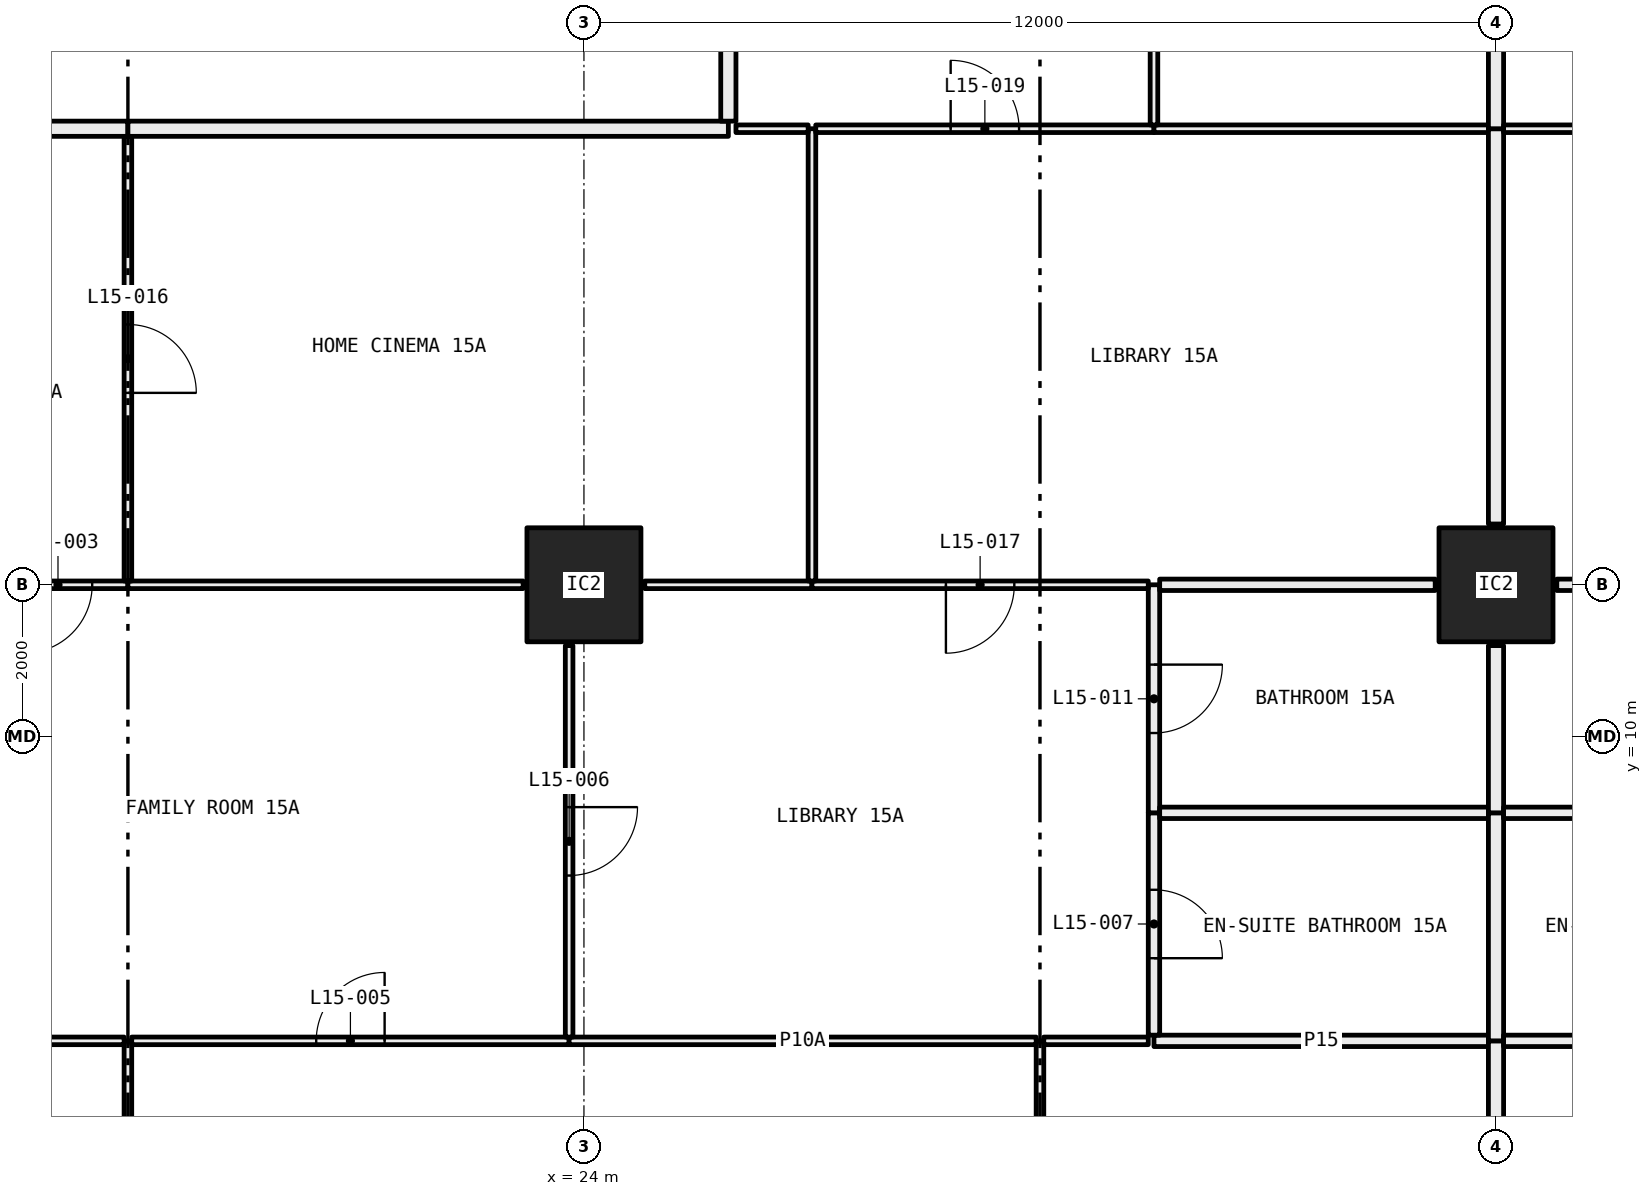
"""IFC4 building model, lengths in metres.
Left out: names, types, materials, properties, quantities, classifications, styles, units other than length and angle.
Written with IfcOpenShell. Run it as: python <this file> out.ifc"""

import sys

from ifc_helpers import new_model, si_unit, direction, frame, frame_2d, origin, origin_2d, place, context, subcontext, project, spatial, rectangle, hollow_rectangle, extrude, element, fill, save


model = new_model("IFC4")
c1 = context("Model", 3, precision=1e-05, world=origin(), true_north=direction((0.0, 1.0)))
c2 = subcontext(c1, "Body", "Model", "MODEL_VIEW")
j1 = project(units=[si_unit("LENGTHUNIT", "METRE"), si_unit("PLANEANGLEUNIT", "RADIAN")], contexts=[c1])
p1 = place(None, origin())
s1 = spatial("IfcSite", under=j1, at=p1, CompositionType="ELEMENT")
p2 = place(p1, origin())
s2 = spatial("IfcBuilding", under=s1, at=p2, CompositionType="ELEMENT")
p3 = place(p2, frame((0.0, 0.0, 64.5)))
s3 = spatial("IfcBuildingStorey", under=s2, at=p3, CompositionType="ELEMENT", Elevation=64.5)
for number, where, z_axis, x_axis in (
    (1, (24.0, 12.0, 0.0), (0.0, 0.0, 1.0), (1.0, 0.0, 0.0)),
    (2, (36.0, 12.0, 0.0), (0.0, 0.0, 1.0), (1.0, 0.0, 0.0)),
):
    element("IfcColumn", number, at=place(p3, frame(where, z_axis=z_axis, x_axis=x_axis)), inside=s3, PredefinedType="COLUMN", context=c2, shape_type="SweptSolid", body=[
        extrude(hollow_rectangle(XDim=1.5, YDim=1.5, WallThickness=0.065, at=origin_2d()), origin(), (0.0, 0.0, 1.0), 3.05),
    ])
p4 = place(p3, frame((18.0, 0.72, 0.0), z_axis=(0.0, 0.0, 1.0), x_axis=(0.0, 1.0, 0.0)))
e3 = element("IfcWall", 3, at=p4, inside=s3, PredefinedType="PARTITIONING", context=c2, shape_type="SweptSolid", body=[
    extrude(rectangle(XDim=5.28, YDim=0.1, at=frame_2d((2.64, 0.0))), origin(), (0.0, 0.0, 1.0), 3.05),
])
p5 = place(p4, frame((2.19, 0.0, 0.0)))
e4 = element("IfcOpeningElement", 4, at=p5, cuts=e3, PredefinedType="OPENING", context=c2, shape_type="SweptSolid", body=[
    extrude(rectangle(XDim=0.9, YDim=2.1, at=frame_2d((0.45, 1.05))), frame((0.0, 0.06, 0.0), z_axis=(0.0, -1.0, 0.0), x_axis=(1.0, 0.0, 0.0)), (0.0, 0.0, 1.0), 0.12),
])
p6 = place(p3, frame((17.95, 6.0, 0.0), z_axis=(0.0, 0.0, 1.0), x_axis=(-1.0, 0.0, 0.0)))
e5 = element("IfcWall", 5, at=p6, inside=s3, PredefinedType="PARTITIONING", context=c2, shape_type="SweptSolid", body=[
    extrude(rectangle(XDim=1.84, YDim=0.1, at=frame_2d((0.92, 0.0))), origin(), (0.0, 0.0, 1.0), 3.05),
])
p7 = place(p3, frame((30.0, 0.72, 0.0), z_axis=(0.0, 0.0, 1.0), x_axis=(0.0, 1.0, 0.0)))
e6 = element("IfcWall", 6, at=p7, inside=s3, PredefinedType="PARTITIONING", context=c2, shape_type="SweptSolid", body=[
    extrude(rectangle(XDim=5.28, YDim=0.1, at=frame_2d((2.64, 0.0))), origin(), (0.0, 0.0, 1.0), 3.05),
])
p8 = place(p7, frame((2.19, 0.0, 0.0)))
e7 = element("IfcOpeningElement", 7, at=p8, cuts=e6, PredefinedType="OPENING", context=c2, shape_type="SweptSolid", body=[
    extrude(rectangle(XDim=0.9, YDim=2.1, at=frame_2d((0.45, 1.05))), frame((0.0, 0.06, 0.0), z_axis=(0.0, -1.0, 0.0), x_axis=(1.0, 0.0, 0.0)), (0.0, 0.0, 1.0), 0.12),
])
p9 = place(p3, frame((23.805, 6.0, 0.0), z_axis=(0.0, 0.0, 1.0), x_axis=(-1.0, 0.0, 0.0)))
e8 = element("IfcWall", 8, at=p9, inside=s3, PredefinedType="PARTITIONING", context=c2, shape_type="SweptSolid", body=[
    extrude(rectangle(XDim=5.755, YDim=0.1, at=frame_2d((2.877, 0.0))), origin(), (0.0, 0.0, 1.0), 3.05),
])
p10 = place(p9, frame((2.427, 0.0, 0.0)))
e9 = element("IfcOpeningElement", 9, at=p10, cuts=e8, PredefinedType="OPENING", context=c2, shape_type="SweptSolid", body=[
    extrude(rectangle(XDim=0.9, YDim=2.1, at=frame_2d((0.45, 1.05))), frame((0.0, 0.06, 0.0), z_axis=(0.0, -1.0, 0.0), x_axis=(1.0, 0.0, 0.0)), (0.0, 0.0, 1.0), 0.12),
])
p11 = place(p3, frame((29.95, 6.0, 0.0), z_axis=(0.0, 0.0, 1.0), x_axis=(-1.0, 0.0, 0.0)))
e10 = element("IfcWall", 10, at=p11, inside=s3, PredefinedType="PARTITIONING", context=c2, shape_type="SweptSolid", body=[
    extrude(rectangle(XDim=6.145, YDim=0.1, at=frame_2d((3.073, 0.0))), origin(), (0.0, 0.0, 1.0), 2.45),
])
p12 = place(p3, frame((31.425, 6.0, 0.0), z_axis=(0.0, 0.0, 1.0), x_axis=(-1.0, 0.0, 0.0)))
e11 = element("IfcWall", 11, at=p12, inside=s3, PredefinedType="PARTITIONING", context=c2, shape_type="SweptSolid", body=[
    extrude(rectangle(XDim=1.375, YDim=0.1, at=frame_2d((0.688, 0.0))), origin(), (0.0, 0.0, 1.0), 3.05),
])
p13 = place(p3, frame((35.9, 6.0, 0.0), z_axis=(0.0, 0.0, 1.0), x_axis=(-1.0, 0.0, 0.0)))
e12 = element("IfcWall", 12, at=p13, inside=s3, PredefinedType="PARTITIONING", context=c2, shape_type="SweptSolid", body=[
    extrude(rectangle(XDim=4.4, YDim=0.15, at=frame_2d((2.2, 0.0))), origin(), (0.0, 0.0, 1.0), 3.05),
])
p14 = place(p3, frame((36.0, 0.72, 0.0), z_axis=(0.0, 0.0, 1.0), x_axis=(0.0, 1.0, 0.0)))
e13 = element("IfcWall", 13, at=p14, inside=s3, PredefinedType="PARTITIONING", context=c2, shape_type="SweptSolid", body=[
    extrude(rectangle(XDim=5.28, YDim=0.2, at=frame_2d((2.64, 0.0))), origin(), (0.0, 0.0, 1.0), 2.45),
])
p15 = place(p3, frame((23.805, 6.05, 0.0), z_axis=(0.0, 0.0, 1.0), x_axis=(0.0, 1.0, 0.0)))
e14 = element("IfcWall", 14, at=p15, inside=s3, PredefinedType="PARTITIONING", context=c2, shape_type="SweptSolid", body=[
    extrude(rectangle(XDim=5.15, YDim=0.1, at=frame_2d((2.575, 0.0))), origin(), (0.0, 0.0, 1.0), 3.05),
])
p16 = place(p15, frame((2.125, 0.0, 0.0)))
e15 = element("IfcOpeningElement", 15, at=p16, cuts=e14, PredefinedType="OPENING", context=c2, shape_type="SweptSolid", body=[
    extrude(rectangle(XDim=0.9, YDim=2.1, at=frame_2d((0.45, 1.05))), frame((0.0, 0.06, 0.0), z_axis=(0.0, -1.0, 0.0), x_axis=(1.0, 0.0, 0.0)), (0.0, 0.0, 1.0), 0.12),
])
p17 = place(p3, frame((18.0, 12.0, 0.0), z_axis=(0.0, 0.0, 1.0), x_axis=(-1.0, 0.0, 0.0)))
e16 = element("IfcWall", 16, at=p17, inside=s3, PredefinedType="PARTITIONING", context=c2, shape_type="SweptSolid", body=[
    extrude(rectangle(XDim=1.84, YDim=0.1, at=frame_2d((0.92, 0.0))), origin(), (0.0, 0.0, 1.0), 2.45),
])
p18 = place(p17, frame((0.47, 0.0, 0.0)))
e17 = element("IfcOpeningElement", 17, at=p18, cuts=e16, PredefinedType="OPENING", context=c2, shape_type="SweptSolid", body=[
    extrude(rectangle(XDim=0.9, YDim=2.1, at=frame_2d((0.45, 1.05))), frame((0.0, 0.06, 0.0), z_axis=(0.0, -1.0, 0.0), x_axis=(1.0, 0.0, 0.0)), (0.0, 0.0, 1.0), 0.12),
])
p19 = place(p3, frame((23.2, 12.0, 0.0), z_axis=(0.0, 0.0, 1.0), x_axis=(-1.0, 0.0, 0.0)))
e18 = element("IfcWall", 18, at=p19, inside=s3, PredefinedType="PARTITIONING", context=c2, shape_type="SweptSolid", body=[
    extrude(rectangle(XDim=5.2, YDim=0.1, at=frame_2d((2.6, 0.0))), origin(), (0.0, 0.0, 1.0), 2.45),
])
p20 = place(p3, frame((31.5, 6.075, 0.0), z_axis=(0.0, 0.0, 1.0), x_axis=(0.0, 1.0, 0.0)))
e19 = element("IfcWall", 19, at=p20, inside=s3, PredefinedType="PARTITIONING", context=c2, shape_type="SweptSolid", body=[
    extrude(rectangle(XDim=2.925, YDim=0.15, at=frame_2d((1.462, 0.0))), origin(), (0.0, 0.0, 1.0), 3.05),
])
p21 = place(p20, frame((1.012, 0.0, 0.0)))
e20 = element("IfcOpeningElement", 20, at=p21, cuts=e19, PredefinedType="OPENING", context=c2, shape_type="SweptSolid", body=[
    extrude(rectangle(XDim=0.9, YDim=2.1, at=frame_2d((0.45, 1.05))), frame((0.0, 0.085, 0.0), z_axis=(0.0, -1.0, 0.0), x_axis=(1.0, 0.0, 0.0)), (0.0, 0.0, 1.0), 0.17),
])
p22 = place(p3, frame((31.5, 9.0, 0.0), z_axis=(0.0, 0.0, 1.0), x_axis=(0.0, 1.0, 0.0)))
e21 = element("IfcWall", 21, at=p22, inside=s3, PredefinedType="PARTITIONING", context=c2, shape_type="SweptSolid", body=[
    extrude(rectangle(XDim=3.0, YDim=0.15, at=frame_2d((1.5, 0.0))), origin(), (0.0, 0.0, 1.0), 2.45),
])
p23 = place(p22, frame((1.05, 0.0, 0.0)))
e22 = element("IfcOpeningElement", 22, at=p23, cuts=e21, PredefinedType="OPENING", context=c2, shape_type="SweptSolid", body=[
    extrude(rectangle(XDim=0.9, YDim=2.1, at=frame_2d((0.45, 1.05))), frame((0.0, 0.085, 0.0), z_axis=(0.0, -1.0, 0.0), x_axis=(1.0, 0.0, 0.0)), (0.0, 0.0, 1.0), 0.17),
])
p24 = place(p3, frame((27.0, 12.0, 0.0), z_axis=(0.0, 0.0, 1.0), x_axis=(-1.0, 0.0, 0.0)))
e23 = element("IfcWall", 23, at=p24, inside=s3, PredefinedType="PARTITIONING", context=c2, shape_type="SweptSolid", body=[
    extrude(rectangle(XDim=2.2, YDim=0.1, at=frame_2d((1.1, 0.0))), origin(), (0.0, 0.0, 1.0), 2.45),
])
p25 = place(p3, frame((31.425, 12.0, 0.0), z_axis=(0.0, 0.0, 1.0), x_axis=(-1.0, 0.0, 0.0)))
e24 = element("IfcWall", 24, at=p25, inside=s3, PredefinedType="PARTITIONING", context=c2, shape_type="SweptSolid", body=[
    extrude(rectangle(XDim=4.425, YDim=0.1, at=frame_2d((2.212, 0.0))), origin(), (0.0, 0.0, 1.0), 2.45),
])
p26 = place(p25, frame((1.762, 0.0, 0.0)))
e25 = element("IfcOpeningElement", 25, at=p26, cuts=e24, PredefinedType="OPENING", context=c2, shape_type="SweptSolid", body=[
    extrude(rectangle(XDim=0.9, YDim=2.1, at=frame_2d((0.45, 1.05))), frame((0.0, 0.06, 0.0), z_axis=(0.0, -1.0, 0.0), x_axis=(1.0, 0.0, 0.0)), (0.0, 0.0, 1.0), 0.12),
])
p27 = place(p3, frame((35.9, 9.0, 0.0), z_axis=(0.0, 0.0, 1.0), x_axis=(-1.0, 0.0, 0.0)))
e26 = element("IfcWall", 26, at=p27, inside=s3, PredefinedType="PARTITIONING", context=c2, shape_type="SweptSolid", body=[
    extrude(rectangle(XDim=4.325, YDim=0.15, at=frame_2d((2.163, 0.0))), origin(), (0.0, 0.0, 1.0), 3.05),
])
p28 = place(p3, frame((36.0, 6.0, 0.0), z_axis=(0.0, 0.0, 1.0), x_axis=(0.0, 1.0, 0.0)))
e27 = element("IfcWall", 27, at=p28, inside=s3, PredefinedType="PARTITIONING", context=c2, shape_type="SweptSolid", body=[
    extrude(rectangle(XDim=3.0, YDim=0.2, at=frame_2d((1.5, 0.0))), origin(), (0.0, 0.0, 1.0), 2.45),
])
p29 = place(p3, frame((35.2, 12.0, 0.0), z_axis=(0.0, 0.0, 1.0), x_axis=(-1.0, 0.0, 0.0)))
e28 = element("IfcWall", 28, at=p29, inside=s3, PredefinedType="PARTITIONING", context=c2, shape_type="SweptSolid", body=[
    extrude(rectangle(XDim=3.625, YDim=0.15, at=frame_2d((1.812, 0.0))), origin(), (0.0, 0.0, 1.0), 2.45),
])
p30 = place(p3, frame((36.0, 9.0, 0.0), z_axis=(0.0, 0.0, 1.0), x_axis=(0.0, 1.0, 0.0)))
e29 = element("IfcWall", 29, at=p30, inside=s3, PredefinedType="PARTITIONING", context=c2, shape_type="SweptSolid", body=[
    extrude(rectangle(XDim=2.2, YDim=0.2, at=frame_2d((1.1, 0.0))), origin(), (0.0, 0.0, 1.0), 2.45),
])
p31 = place(p3, frame((18.0, 12.05, 0.0), z_axis=(0.0, 0.0, 1.0), x_axis=(0.0, 1.0, 0.0)))
e30 = element("IfcWall", 30, at=p31, inside=s3, PredefinedType="PARTITIONING", context=c2, shape_type="SweptSolid", body=[
    extrude(rectangle(XDim=5.85, YDim=0.1, at=frame_2d((2.925, 0.0))), origin(), (0.0, 0.0, 1.0), 2.45),
])
p32 = place(p31, frame((2.475, 0.0, 0.0)))
e31 = element("IfcOpeningElement", 31, at=p32, cuts=e30, PredefinedType="OPENING", context=c2, shape_type="SweptSolid", body=[
    extrude(rectangle(XDim=0.9, YDim=2.1, at=frame_2d((0.45, 1.05))), frame((0.0, 0.06, 0.0), z_axis=(0.0, -1.0, 0.0), x_axis=(1.0, 0.0, 0.0)), (0.0, 0.0, 1.0), 0.12),
])
p33 = place(p3, frame((18.0, 18.0, 0.0), z_axis=(0.0, 0.0, 1.0), x_axis=(-1.0, 0.0, 0.0)))
e32 = element("IfcWall", 32, at=p33, inside=s3, PredefinedType="PARTITIONING", context=c2, shape_type="SweptSolid", body=[
    extrude(rectangle(XDim=4.5, YDim=0.2, at=frame_2d((2.25, 0.0))), origin(), (0.0, 0.0, 1.0), 3.05),
])
p34 = place(p33, frame((1.75, 0.0, 0.0)))
e33 = element("IfcOpeningElement", 33, at=p34, cuts=e32, PredefinedType="OPENING", context=c2, shape_type="SweptSolid", body=[
    extrude(rectangle(XDim=1.0, YDim=2.1, at=frame_2d((0.5, 1.05))), frame((0.0, 0.11, 0.0), z_axis=(0.0, -1.0, 0.0), x_axis=(1.0, 0.0, 0.0)), (0.0, 0.0, 1.0), 0.22),
])
p35 = place(p3, frame((27.0, 12.05, 0.0), z_axis=(0.0, 0.0, 1.0), x_axis=(0.0, 1.0, 0.0)))
e34 = element("IfcWall", 34, at=p35, inside=s3, PredefinedType="PARTITIONING", context=c2, shape_type="SweptSolid", body=[
    extrude(rectangle(XDim=5.95, YDim=0.1, at=frame_2d((2.975, 0.0))), origin(), (0.0, 0.0, 1.0), 2.45),
])
p36 = place(p3, frame((26.95, 18.0, 0.0), z_axis=(0.0, 0.0, 1.0), x_axis=(-1.0, 0.0, 0.0)))
e35 = element("IfcWall", 35, at=p36, inside=s3, PredefinedType="PARTITIONING", context=c2, shape_type="SweptSolid", body=[
    extrude(rectangle(XDim=0.95, YDim=0.1, at=frame_2d((0.475, 0.0))), origin(), (0.0, 0.0, 1.0), 3.05),
])
p37 = place(p3, frame((25.9, 18.0, 0.0), z_axis=(0.0, 0.0, 1.0), x_axis=(-1.0, 0.0, 0.0)))
e36 = element("IfcWall", 36, at=p37, inside=s3, PredefinedType="PARTITIONING", context=c2, shape_type="SweptSolid", body=[
    extrude(rectangle(XDim=7.9, YDim=0.2, at=frame_2d((3.95, 0.0))), origin(), (0.0, 0.0, 1.0), 3.05),
])
p38 = place(p3, frame((31.5, 18.0, 0.0), z_axis=(0.0, 0.0, 1.0), x_axis=(-1.0, 0.0, 0.0)))
e37 = element("IfcWall", 37, at=p38, inside=s3, PredefinedType="PARTITIONING", context=c2, shape_type="SweptSolid", body=[
    extrude(rectangle(XDim=4.45, YDim=0.1, at=frame_2d((2.225, 0.0))), origin(), (0.0, 0.0, 1.0), 3.05),
])
p39 = place(p38, frame((1.775, 0.0, 0.0)))
e38 = element("IfcOpeningElement", 38, at=p39, cuts=e37, PredefinedType="OPENING", context=c2, shape_type="SweptSolid", body=[
    extrude(rectangle(XDim=0.9, YDim=2.1, at=frame_2d((0.45, 1.05))), frame((0.0, 0.06, 0.0), z_axis=(0.0, -1.0, 0.0), x_axis=(1.0, 0.0, 0.0)), (0.0, 0.0, 1.0), 0.12),
])
p40 = place(p3, frame((35.9, 18.0, 0.0), z_axis=(0.0, 0.0, 1.0), x_axis=(-1.0, 0.0, 0.0)))
e39 = element("IfcWall", 39, at=p40, inside=s3, PredefinedType="PARTITIONING", context=c2, shape_type="SweptSolid", body=[
    extrude(rectangle(XDim=4.4, YDim=0.1, at=frame_2d((2.2, 0.0))), origin(), (0.0, 0.0, 1.0), 3.05),
])
p41 = place(p3, frame((36.0, 12.8, 0.0), z_axis=(0.0, 0.0, 1.0), x_axis=(0.0, 1.0, 0.0)))
e40 = element("IfcWall", 40, at=p41, inside=s3, PredefinedType="PARTITIONING", context=c2, shape_type="SweptSolid", body=[
    extrude(rectangle(XDim=5.2, YDim=0.2, at=frame_2d((2.6, 0.0))), origin(), (0.0, 0.0, 1.0), 2.45),
])
p42 = place(p3, frame((31.5, 18.05, 0.0), z_axis=(0.0, 0.0, 1.0), x_axis=(0.0, 1.0, 0.0)))
e41 = element("IfcWall", 41, at=p42, inside=s3, PredefinedType="PARTITIONING", context=c2, shape_type="SweptSolid", body=[
    extrude(rectangle(XDim=6.25, YDim=0.1, at=frame_2d((3.125, 0.0))), origin(), (0.0, 0.0, 1.0), 2.45),
])
p43 = place(p42, frame((2.675, 0.0, 0.0)))
e42 = element("IfcOpeningElement", 42, at=p43, cuts=e41, PredefinedType="OPENING", context=c2, shape_type="SweptSolid", body=[
    extrude(rectangle(XDim=0.9, YDim=2.1, at=frame_2d((0.45, 1.05))), frame((0.0, 0.06, 0.0), z_axis=(0.0, -1.0, 0.0), x_axis=(1.0, 0.0, 0.0)), (0.0, 0.0, 1.0), 0.12),
])
p44 = place(p3, frame((25.9, 23.9, 0.0), z_axis=(0.0, 0.0, 1.0), x_axis=(0.0, -1.0, 0.0)))
e43 = element("IfcWall", 43, at=p44, inside=s3, PredefinedType="PARTITIONING", context=c2, shape_type="SweptSolid", body=[
    extrude(rectangle(XDim=5.8, YDim=0.2, at=frame_2d((2.9, 0.0))), origin(), (0.0, 0.0, 1.0), 3.05),
])
p45 = place(p3, frame((36.0, 18.0, 0.0), z_axis=(0.0, 0.0, 1.0), x_axis=(0.0, 1.0, 0.0)))
e44 = element("IfcWall", 44, at=p45, inside=s3, PredefinedType="PARTITIONING", context=c2, shape_type="SweptSolid", body=[
    extrude(rectangle(XDim=5.2, YDim=0.2, at=frame_2d((2.6, 0.0))), origin(), (0.0, 0.0, 1.0), 2.45),
])
for number, where, z_axis, x_axis in (
    (45, (40.5, 6.0, 0.0), (0.0, 0.0, 1.0), (-1.0, 0.0, 0.0)),
    (46, (40.5, 9.0, 0.0), (0.0, 0.0, 1.0), (-1.0, 0.0, 0.0)),
):
    element("IfcWall", number, at=place(p3, frame(where, z_axis=z_axis, x_axis=x_axis)), inside=s3, PredefinedType="PARTITIONING", context=c2, shape_type="SweptSolid", body=[
        extrude(rectangle(XDim=4.4, YDim=0.15, at=frame_2d((2.2, 0.0))), origin(), (0.0, 0.0, 1.0), 3.05),
    ])
p46 = place(p3, frame((40.425, 12.0, 0.0), z_axis=(0.0, 0.0, 1.0), x_axis=(-1.0, 0.0, 0.0)))
e47 = element("IfcWall", 47, at=p46, inside=s3, PredefinedType="PARTITIONING", context=c2, shape_type="SweptSolid", body=[
    extrude(rectangle(XDim=3.625, YDim=0.15, at=frame_2d((1.812, 0.0))), origin(), (0.0, 0.0, 1.0), 2.45),
])
p47 = place(p3, frame((40.5, 18.0, 0.0), z_axis=(0.0, 0.0, 1.0), x_axis=(-1.0, 0.0, 0.0)))
e48 = element("IfcWall", 48, at=p47, inside=s3, PredefinedType="PARTITIONING", context=c2, shape_type="SweptSolid", body=[
    extrude(rectangle(XDim=4.4, YDim=0.1, at=frame_2d((2.2, 0.0))), origin(), (0.0, 0.0, 1.0), 3.05),
])
p48 = place(p47, frame((1.75, 0.0, 0.0)))
e49 = element("IfcOpeningElement", 49, at=p48, cuts=e48, PredefinedType="OPENING", context=c2, shape_type="SweptSolid", body=[
    extrude(rectangle(XDim=0.9, YDim=2.1, at=frame_2d((0.45, 1.05))), frame((0.0, 0.06, 0.0), z_axis=(0.0, -1.0, 0.0), x_axis=(1.0, 0.0, 0.0)), (0.0, 0.0, 1.0), 0.12),
])
p49 = place(p18, origin())
e50 = element("IfcDoor", 50, at=p49, inside=s3, OperationType="SINGLE_SWING_LEFT", PredefinedType="DOOR", context=c2, shape_type="SweptSolid", body=[
    extrude(rectangle(XDim=0.9, YDim=2.1, at=frame_2d((0.45, 1.05))), frame((0.0, 0.025, 0.0), z_axis=(0.0, -1.0, 0.0), x_axis=(1.0, 0.0, 0.0)), (0.0, 0.0, 1.0), 0.05),
])
fill(e17, e50)
p50 = place(p10, frame((0.9, 0.0, 0.0), x_axis=(-1.0, 0.0, 0.0)))
e51 = element("IfcDoor", 51, at=p50, inside=s3, OperationType="SINGLE_SWING_LEFT", PredefinedType="DOOR", context=c2, shape_type="SweptSolid", body=[
    extrude(rectangle(XDim=0.9, YDim=2.1, at=frame_2d((0.45, 1.05))), frame((0.0, 0.025, 0.0), z_axis=(0.0, -1.0, 0.0), x_axis=(1.0, 0.0, 0.0)), (0.0, 0.0, 1.0), 0.05),
])
fill(e9, e51)
p51 = place(p16, frame((0.9, 0.0, 0.0), x_axis=(-1.0, 0.0, 0.0)))
e52 = element("IfcDoor", 52, at=p51, inside=s3, OperationType="SINGLE_SWING_RIGHT", PredefinedType="DOOR", context=c2, shape_type="SweptSolid", body=[
    extrude(rectangle(XDim=0.9, YDim=2.1, at=frame_2d((0.45, 1.05))), frame((0.0, 0.025, 0.0), z_axis=(0.0, -1.0, 0.0), x_axis=(1.0, 0.0, 0.0)), (0.0, 0.0, 1.0), 0.05),
])
fill(e15, e52)
p52 = place(p21, frame((0.9, 0.0, 0.0), x_axis=(-1.0, 0.0, 0.0)))
e53 = element("IfcDoor", 53, at=p52, inside=s3, OperationType="SINGLE_SWING_LEFT", PredefinedType="DOOR", context=c2, shape_type="SweptSolid", body=[
    extrude(rectangle(XDim=0.9, YDim=2.1, at=frame_2d((0.45, 1.05))), frame((0.0, 0.025, 0.0), z_axis=(0.0, -1.0, 0.0), x_axis=(1.0, 0.0, 0.0)), (0.0, 0.0, 1.0), 0.05),
])
fill(e20, e53)
p53 = place(p23, frame((0.9, 0.0, 0.0), x_axis=(-1.0, 0.0, 0.0)))
e54 = element("IfcDoor", 54, at=p53, inside=s3, OperationType="SINGLE_SWING_RIGHT", PredefinedType="DOOR", context=c2, shape_type="SweptSolid", body=[
    extrude(rectangle(XDim=0.9, YDim=2.1, at=frame_2d((0.45, 1.05))), frame((0.0, 0.025, 0.0), z_axis=(0.0, -1.0, 0.0), x_axis=(1.0, 0.0, 0.0)), (0.0, 0.0, 1.0), 0.05),
])
fill(e22, e54)
p54 = place(p32, frame((0.9, 0.0, 0.0), x_axis=(-1.0, 0.0, 0.0)))
e55 = element("IfcDoor", 55, at=p54, inside=s3, OperationType="SINGLE_SWING_LEFT", PredefinedType="DOOR", context=c2, shape_type="SweptSolid", body=[
    extrude(rectangle(XDim=0.9, YDim=2.1, at=frame_2d((0.45, 1.05))), frame((0.0, 0.025, 0.0), z_axis=(0.0, -1.0, 0.0), x_axis=(1.0, 0.0, 0.0)), (0.0, 0.0, 1.0), 0.05),
])
fill(e31, e55)
p55 = place(p26, origin())
e56 = element("IfcDoor", 56, at=p55, inside=s3, OperationType="SINGLE_SWING_LEFT", PredefinedType="DOOR", context=c2, shape_type="SweptSolid", body=[
    extrude(rectangle(XDim=0.9, YDim=2.1, at=frame_2d((0.45, 1.05))), frame((0.0, 0.025, 0.0), z_axis=(0.0, -1.0, 0.0), x_axis=(1.0, 0.0, 0.0)), (0.0, 0.0, 1.0), 0.05),
])
fill(e25, e56)
p56 = place(p39, frame((0.9, 0.0, 0.0), x_axis=(-1.0, 0.0, 0.0)))
e57 = element("IfcDoor", 57, at=p56, inside=s3, OperationType="SINGLE_SWING_RIGHT", PredefinedType="DOOR", context=c2, shape_type="SweptSolid", body=[
    extrude(rectangle(XDim=0.9, YDim=2.1, at=frame_2d((0.45, 1.05))), frame((0.0, 0.025, 0.0), z_axis=(0.0, -1.0, 0.0), x_axis=(1.0, 0.0, 0.0)), (0.0, 0.0, 1.0), 0.05),
])
fill(e38, e57)
save(model, sys.argv[1])
